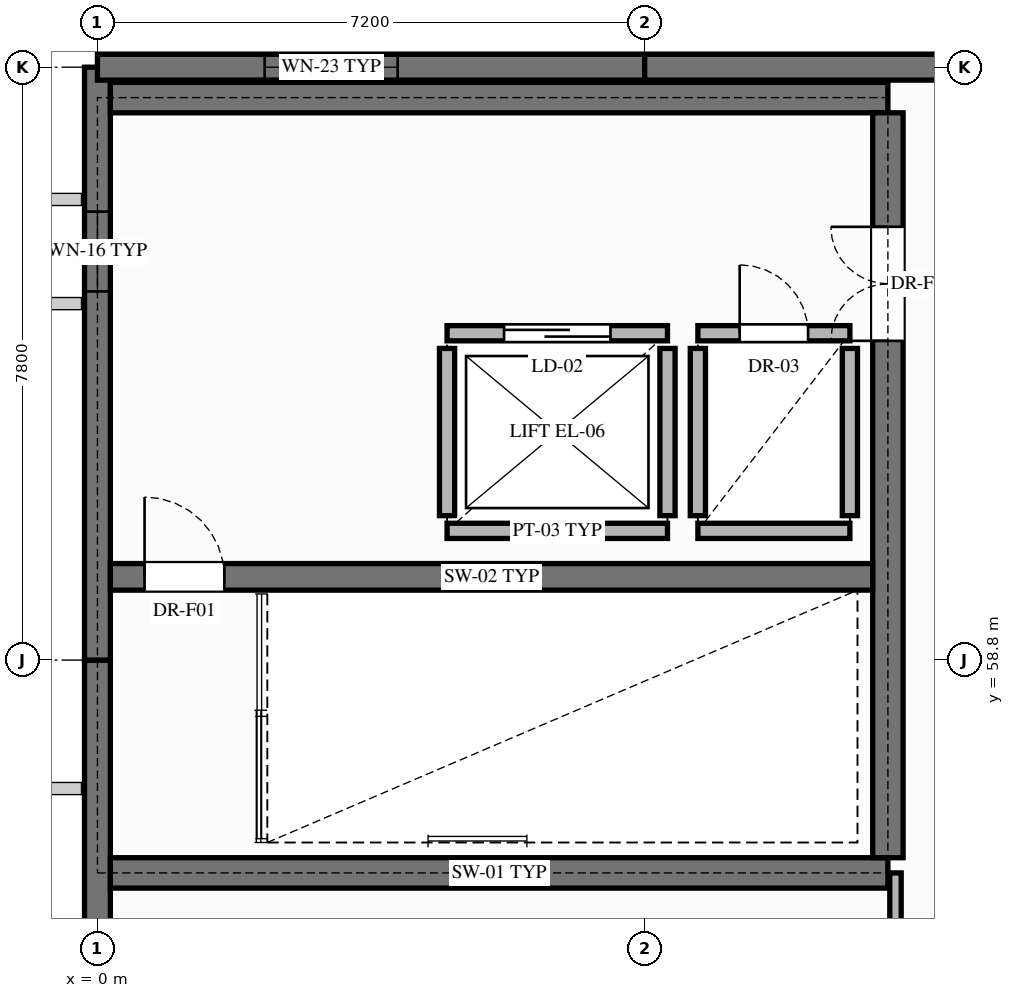
"""IFC4 building model, lengths in metres.
Left out: names, types, materials, properties, quantities, classifications, styles, units other than length and angle.
Written with IfcOpenShell. Run it as: python <this file> out.ifc"""

import sys

from ifc_helpers import new_model, si_unit, direction, frame, frame_2d, origin, place, context, subcontext, project, spatial, rectangle, extrude, element, fill, save


model = new_model("IFC4")
c1 = context("Model", 3, precision=1e-05, world=origin(), true_north=direction((0.0, 1.0)))
c2 = subcontext(c1, "Body", "Model", "MODEL_VIEW")
j1 = project(units=[si_unit("LENGTHUNIT", "METRE"), si_unit("PLANEANGLEUNIT", "RADIAN")], contexts=[c1])
p1 = place(None, origin())
s1 = spatial("IfcSite", under=j1, at=p1, CompositionType="ELEMENT")
p2 = place(p1, origin())
s2 = spatial("IfcBuilding", under=s1, at=p2, CompositionType="ELEMENT")
p3 = place(p2, frame((0.0, 0.0, 16.52)))
s3 = spatial("IfcBuildingStorey", under=s2, at=p3, CompositionType="ELEMENT", Elevation=16.52)
p4 = place(p3, frame((0.0, 51.0, 0.0), z_axis=(0.0, 0.0, 1.0), x_axis=(0.0, 1.0, 0.0)))
e1 = element("IfcWall", 1, at=p4, inside=s3, PredefinedType="SOLIDWALL", context=c2, shape_type="SweptSolid", body=[
    extrude(rectangle(XDim=7.8, YDim=0.34, at=frame_2d((3.9, 0.0))), origin(), (0.0, 0.0, 1.0), 3.46),
])
p5 = place(p4, frame((1.5, 0.0, 0.85)))
e2 = element("IfcOpeningElement", 2, at=p5, cuts=e1, PredefinedType="OPENING", context=c2, shape_type="SweptSolid", body=[
    extrude(rectangle(XDim=2.55, YDim=1.45, at=frame_2d((1.275, 0.725))), frame((0.0, 0.18, 0.0), z_axis=(0.0, -1.0, 0.0), x_axis=(1.0, 0.0, 0.0)), (0.0, 0.0, 1.0), 0.36),
])
p6 = place(p3, frame((0.0, 58.8, 0.0), z_axis=(0.0, 0.0, 1.0), x_axis=(0.0, 1.0, 0.0)))
e3 = element("IfcWall", 3, at=p6, inside=s3, PredefinedType="SOLIDWALL", context=c2, shape_type="SweptSolid", body=[
    extrude(rectangle(XDim=7.8, YDim=0.34, at=frame_2d((3.9, 0.0))), origin(), (0.0, 0.0, 1.0), 3.46),
])
p7 = place(p6, frame((4.85, 0.0, 1.1)))
e4 = element("IfcOpeningElement", 4, at=p7, cuts=e3, PredefinedType="OPENING", context=c2, shape_type="SweptSolid", body=[
    extrude(rectangle(XDim=1.05, YDim=1.75, at=frame_2d((0.525, 0.875))), frame((0.0, 0.18, 0.0), z_axis=(0.0, -1.0, 0.0), x_axis=(1.0, 0.0, 0.0)), (0.0, 0.0, 1.0), 0.36),
])
p8 = place(p3, frame((0.0, 66.6, 0.0), z_axis=(0.0, 0.0, 1.0), x_axis=(1.0, 0.0, 0.0)))
e5 = element("IfcWall", 5, at=p8, inside=s3, PredefinedType="SOLIDWALL", context=c2, shape_type="SweptSolid", body=[
    extrude(rectangle(XDim=7.2, YDim=0.34, at=frame_2d((3.6, 0.0))), origin(), (0.0, 0.0, 1.0), 3.46),
])
p9 = place(p8, frame((2.2, 0.0, 0.9)))
e6 = element("IfcOpeningElement", 6, at=p9, cuts=e5, PredefinedType="OPENING", context=c2, shape_type="SweptSolid", body=[
    extrude(rectangle(XDim=1.75, YDim=2.15, at=frame_2d((0.875, 1.075))), frame((0.0, 0.18, 0.0), z_axis=(0.0, -1.0, 0.0), x_axis=(1.0, 0.0, 0.0)), (0.0, 0.0, 1.0), 0.36),
])
p10 = place(p3, frame((7.2, 66.6, 0.0), z_axis=(0.0, 0.0, 1.0), x_axis=(1.0, 0.0, 0.0)))
e7 = element("IfcWall", 7, at=p10, inside=s3, PredefinedType="SOLIDWALL", context=c2, shape_type="SweptSolid", body=[
    extrude(rectangle(XDim=7.2, YDim=0.34, at=frame_2d((3.6, 0.0))), origin(), (0.0, 0.0, 1.0), 3.46),
])
p11 = place(p10, frame((4.4, 0.0, 0.9)))
e8 = element("IfcOpeningElement", 8, at=p11, cuts=e7, PredefinedType="OPENING", context=c2, shape_type="SweptSolid", body=[
    extrude(rectangle(XDim=1.75, YDim=2.15, at=frame_2d((0.875, 1.075))), frame((0.0, 0.18, 0.0), z_axis=(0.0, -1.0, 0.0), x_axis=(1.0, 0.0, 0.0)), (0.0, 0.0, 1.0), 0.36),
])
for number, where, z_axis, x_axis in (
    (9, (0.17, 56.0, 0.0), (0.0, 0.0, 1.0), (1.0, 0.0, 0.0)),
    (10, (0.17, 66.2, 0.0), (0.0, 0.0, 1.0), (1.0, 0.0, 0.0)),
):
    element("IfcWall", number, at=place(p3, frame(where, z_axis=z_axis, x_axis=x_axis)), inside=s3, PredefinedType="SHEAR", context=c2, shape_type="SweptSolid", body=[
        extrude(rectangle(XDim=10.23, YDim=0.4, at=frame_2d((5.115, 0.0))), origin(), (0.0, 0.0, 1.0), 3.46),
    ])
p12 = place(p3, frame((10.4, 56.2, 0.0), z_axis=(0.0, 0.0, 1.0), x_axis=(0.0, 1.0, 0.0)))
e11 = element("IfcWall", 11, at=p12, inside=s3, PredefinedType="SHEAR", context=c2, shape_type="SweptSolid", body=[
    extrude(rectangle(XDim=9.8, YDim=0.4, at=frame_2d((4.9, 0.0))), origin(), (0.0, 0.0, 1.0), 3.46),
])
p13 = place(p12, frame((6.8, 0.0, 0.0)))
e12 = element("IfcOpeningElement", 12, at=p13, cuts=e11, PredefinedType="OPENING", context=c2, shape_type="SweptSolid", body=[
    extrude(rectangle(XDim=1.5, YDim=2.2, at=frame_2d((0.75, 1.1))), frame((0.0, 0.21, 0.0), z_axis=(0.0, -1.0, 0.0), x_axis=(1.0, 0.0, 0.0)), (0.0, 0.0, 1.0), 0.42),
])
p14 = place(p3, frame((0.17, 59.895, 0.0), z_axis=(0.0, 0.0, 1.0), x_axis=(1.0, 0.0, 0.0)))
e13 = element("IfcWall", 13, at=p14, inside=s3, PredefinedType="SHEAR", context=c2, shape_type="SweptSolid", body=[
    extrude(rectangle(XDim=10.03, YDim=0.35, at=frame_2d((5.015, 0.0))), origin(), (0.0, 0.0, 1.0), 3.46),
])
p15 = place(p14, frame((0.45, 0.0, 0.0)))
e14 = element("IfcOpeningElement", 14, at=p15, cuts=e13, PredefinedType="OPENING", context=c2, shape_type="SweptSolid", body=[
    extrude(rectangle(XDim=1.05, YDim=2.2, at=frame_2d((0.525, 1.1))), frame((0.0, 0.185, 0.0), z_axis=(0.0, -1.0, 0.0), x_axis=(1.0, 0.0, 0.0)), (0.0, 0.0, 1.0), 0.37),
])
p16 = place(p3, frame((4.6, 60.5, 0.0), z_axis=(0.0, 0.0, 1.0), x_axis=(1.0, 0.0, 0.0)))
e15 = element("IfcWall", 15, at=p16, inside=s3, PredefinedType="PARTITIONING", context=c2, shape_type="SweptSolid", body=[
    extrude(rectangle(XDim=2.9, YDim=0.2, at=frame_2d((1.45, 0.0))), origin(), (0.0, 0.0, 1.0), 3.46),
])
p17 = place(p3, frame((4.6, 63.1, 0.0), z_axis=(0.0, 0.0, 1.0), x_axis=(1.0, 0.0, 0.0)))
e16 = element("IfcWall", 16, at=p17, inside=s3, PredefinedType="PARTITIONING", context=c2, shape_type="SweptSolid", body=[
    extrude(rectangle(XDim=2.9, YDim=0.2, at=frame_2d((1.45, 0.0))), origin(), (0.0, 0.0, 1.0), 3.46),
])
p18 = place(p17, frame((0.75, 0.0, 0.0)))
e17 = element("IfcOpeningElement", 17, at=p18, cuts=e16, PredefinedType="OPENING", context=c2, shape_type="SweptSolid", body=[
    extrude(rectangle(XDim=1.4, YDim=2.25, at=frame_2d((0.7, 1.125))), frame((0.0, 0.11, 0.0), z_axis=(0.0, -1.0, 0.0), x_axis=(1.0, 0.0, 0.0)), (0.0, 0.0, 1.0), 0.22),
])
for number, where, z_axis, x_axis in (
    (18, (4.6, 60.7, 0.0), (0.0, 0.0, 1.0), (0.0, 1.0, 0.0)),
    (19, (7.5, 60.7, 0.0), (0.0, 0.0, 1.0), (0.0, 1.0, 0.0)),
):
    element("IfcWall", number, at=place(p3, frame(where, z_axis=z_axis, x_axis=x_axis)), inside=s3, PredefinedType="PARTITIONING", context=c2, shape_type="SweptSolid", body=[
        extrude(rectangle(XDim=2.2, YDim=0.2, at=frame_2d((1.1, 0.0))), origin(), (0.0, 0.0, 1.0), 3.46),
    ])
p19 = place(p3, frame((7.9, 60.5, 0.0), z_axis=(0.0, 0.0, 1.0), x_axis=(1.0, 0.0, 0.0)))
e20 = element("IfcWall", 20, at=p19, inside=s3, PredefinedType="PARTITIONING", context=c2, shape_type="SweptSolid", body=[
    extrude(rectangle(XDim=2.0, YDim=0.2, at=frame_2d((1.0, 0.0))), origin(), (0.0, 0.0, 1.0), 3.46),
])
p20 = place(p3, frame((7.9, 63.1, 0.0), z_axis=(0.0, 0.0, 1.0), x_axis=(1.0, 0.0, 0.0)))
e21 = element("IfcWall", 21, at=p20, inside=s3, PredefinedType="PARTITIONING", context=c2, shape_type="SweptSolid", body=[
    extrude(rectangle(XDim=2.0, YDim=0.2, at=frame_2d((1.0, 0.0))), origin(), (0.0, 0.0, 1.0), 3.46),
])
p21 = place(p20, frame((0.55, 0.0, 0.0)))
e22 = element("IfcOpeningElement", 22, at=p21, cuts=e21, PredefinedType="OPENING", context=c2, shape_type="SweptSolid", body=[
    extrude(rectangle(XDim=0.9, YDim=2.1, at=frame_2d((0.45, 1.05))), frame((0.0, 0.11, 0.0), z_axis=(0.0, -1.0, 0.0), x_axis=(1.0, 0.0, 0.0)), (0.0, 0.0, 1.0), 0.22),
])
for number, where, z_axis, x_axis in (
    (23, (7.9, 60.7, 0.0), (0.0, 0.0, 1.0), (0.0, 1.0, 0.0)),
    (24, (9.9, 60.7, 0.0), (0.0, 0.0, 1.0), (0.0, 1.0, 0.0)),
):
    element("IfcWall", number, at=place(p3, frame(where, z_axis=z_axis, x_axis=x_axis)), inside=s3, PredefinedType="PARTITIONING", context=c2, shape_type="SweptSolid", body=[
        extrude(rectangle(XDim=2.2, YDim=0.2, at=frame_2d((1.1, 0.0))), origin(), (0.0, 0.0, 1.0), 3.46),
    ])
p22 = place(p3, frame((10.5, 36.0, 0.0), z_axis=(0.0, 0.0, 1.0), x_axis=(0.0, 1.0, 0.0)))
e25 = element("IfcWall", 25, at=p22, inside=s3, PredefinedType="PARTITIONING", context=c2, shape_type="SweptSolid", body=[
    extrude(rectangle(XDim=20.0, YDim=0.15, at=frame_2d((10.0, 0.0))), origin(), (0.0, 0.0, 1.0), 3.46),
])
p23 = place(p22, frame((8.5, 0.0, 0.0)))
e26 = element("IfcOpeningElement", 26, at=p23, cuts=e25, PredefinedType="OPENING", context=c2, shape_type="SweptSolid", body=[
    extrude(rectangle(XDim=1.0, YDim=2.15, at=frame_2d((0.5, 1.075))), frame((0.0, 0.085, 0.0), z_axis=(0.0, -1.0, 0.0), x_axis=(1.0, 0.0, 0.0)), (0.0, 0.0, 1.0), 0.17),
])
p24 = place(p7, origin())
e27 = element("IfcWindow", 27, at=p24, inside=s3, PartitioningType="SINGLE_PANEL", PredefinedType="WINDOW", context=c2, shape_type="SweptSolid", body=[
    extrude(rectangle(XDim=1.05, YDim=1.75, at=frame_2d((0.525, 0.875))), frame((0.0, 0.03, 0.0), z_axis=(0.0, -1.0, 0.0), x_axis=(1.0, 0.0, 0.0)), (0.0, 0.0, 1.0), 0.06),
])
fill(e4, e27)
p25 = place(p9, origin())
e28 = element("IfcWindow", 28, at=p25, inside=s3, PartitioningType="SINGLE_PANEL", PredefinedType="WINDOW", context=c2, shape_type="SweptSolid", body=[
    extrude(rectangle(XDim=1.75, YDim=2.15, at=frame_2d((0.875, 1.075))), frame((0.0, 0.03, 0.0), z_axis=(0.0, -1.0, 0.0), x_axis=(1.0, 0.0, 0.0)), (0.0, 0.0, 1.0), 0.06),
])
fill(e6, e28)
p26 = place(p13, origin())
e29 = element("IfcDoor", 29, at=p26, inside=s3, OperationType="DOUBLE_DOOR_SINGLE_SWING", PredefinedType="DOOR", context=c2, shape_type="SweptSolid", body=[
    extrude(rectangle(XDim=1.5, YDim=2.2, at=frame_2d((0.75, 1.1))), frame((0.0, 0.025, 0.0), z_axis=(0.0, -1.0, 0.0), x_axis=(1.0, 0.0, 0.0)), (0.0, 0.0, 1.0), 0.05),
])
fill(e12, e29)
p27 = place(p15, origin())
e30 = element("IfcDoor", 30, at=p27, inside=s3, OperationType="SINGLE_SWING_LEFT", PredefinedType="DOOR", context=c2, shape_type="SweptSolid", body=[
    extrude(rectangle(XDim=1.05, YDim=2.2, at=frame_2d((0.525, 1.1))), frame((0.0, 0.025, 0.0), z_axis=(0.0, -1.0, 0.0), x_axis=(1.0, 0.0, 0.0)), (0.0, 0.0, 1.0), 0.05),
])
fill(e14, e30)
p28 = place(p18, origin())
e31 = element("IfcDoor", 31, at=p28, inside=s3, OperationType="SLIDING_TO_LEFT", PredefinedType="DOOR", context=c2, shape_type="SweptSolid", body=[
    extrude(rectangle(XDim=1.4, YDim=2.25, at=frame_2d((0.7, 1.125))), frame((0.0, 0.025, 0.0), z_axis=(0.0, -1.0, 0.0), x_axis=(1.0, 0.0, 0.0)), (0.0, 0.0, 1.0), 0.05),
])
fill(e17, e31)
p29 = place(p21, origin())
e32 = element("IfcDoor", 32, at=p29, inside=s3, OperationType="SINGLE_SWING_LEFT", PredefinedType="DOOR", context=c2, shape_type="SweptSolid", body=[
    extrude(rectangle(XDim=0.9, YDim=2.1, at=frame_2d((0.45, 1.05))), frame((0.0, 0.025, 0.0), z_axis=(0.0, -1.0, 0.0), x_axis=(1.0, 0.0, 0.0)), (0.0, 0.0, 1.0), 0.05),
])
fill(e22, e32)
save(model, sys.argv[1])
